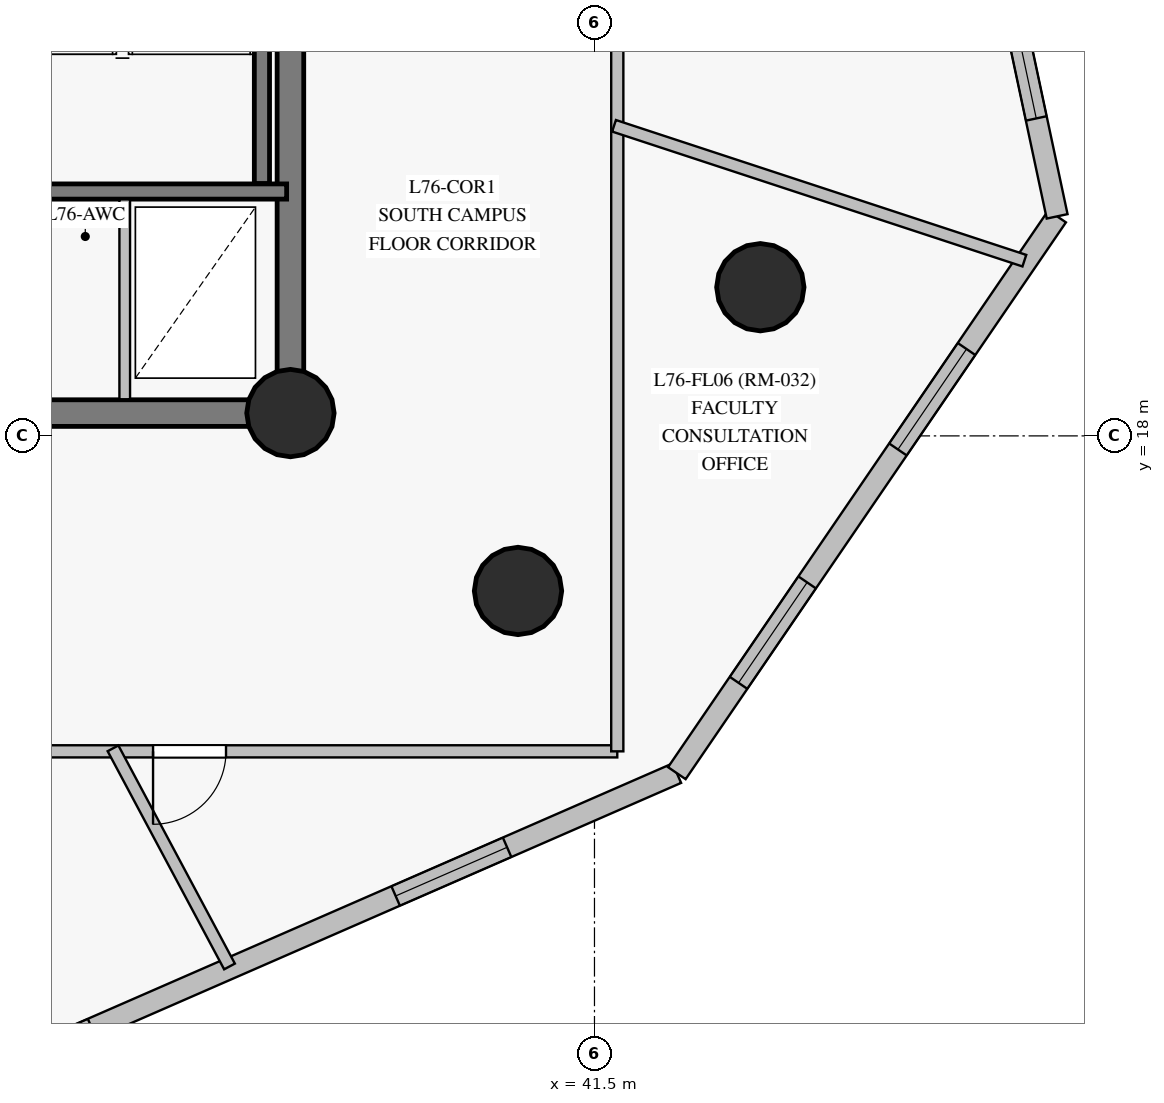
"""IFC4 building model, lengths in metres.
Left out: names, types, materials, properties, quantities, classifications, styles, units other than length and angle.
Written with IfcOpenShell. Run it as: python <this file> out.ifc"""

import sys

from ifc_helpers import new_model, si_unit, direction, frame, frame_2d, origin, origin_with_axes, origin_2d, place, context, subcontext, project, spatial, rectangle, circle, extrude, source, transform, mapped, element, fill, save


model = new_model("IFC4")
c1 = context("Model", 3, precision=1e-05, world=origin(), true_north=direction((0.0, 1.0)))
c2 = subcontext(c1, "Body", "Model", "MODEL_VIEW")
j1 = project(units=[si_unit("LENGTHUNIT", "METRE"), si_unit("PLANEANGLEUNIT", "RADIAN")], contexts=[c1])
p1 = place(None, origin())
s1 = spatial("IfcSite", under=j1, at=p1, CompositionType="ELEMENT")
p2 = place(p1, origin())
s2 = spatial("IfcBuilding", under=s1, at=p2, CompositionType="ELEMENT")
p3 = place(p2, frame((0.0, 0.0, 256.55)))
s3 = spatial("IfcBuildingStorey", under=s2, at=p3, CompositionType="ELEMENT", Elevation=256.55)
p4 = place(p3, frame((26.55, 18.3, 0.0), z_axis=(0.0, 0.0, 1.0), x_axis=(1.0, 0.0, 0.0)))
e1 = element("IfcWall", 1, at=p4, inside=s3, PredefinedType="SHEAR", context=c2, shape_type="SweptSolid", body=[
    extrude(rectangle(XDim=10.95, YDim=0.35, at=frame_2d((5.475, 0.0))), origin(), (0.0, 0.0, 1.0), 2.85),
])
p5 = place(p4, frame((4.55, 0.0, 0.0)))
e2 = element("IfcOpeningElement", 2, at=p5, cuts=e1, PredefinedType="OPENING", context=c2, shape_type="SweptSolid", body=[
    extrude(rectangle(XDim=1.4, YDim=2.2, at=frame_2d((0.7, 1.1))), frame((0.0, 0.185, 0.0), z_axis=(0.0, -1.0, 0.0), x_axis=(1.0, 0.0, 0.0)), (0.0, 0.0, 1.0), 0.37),
])
p6 = place(p3, frame((37.5, 18.3, 0.0), z_axis=(0.0, 0.0, 1.0), x_axis=(0.0, 1.0, 0.0)))
e3 = element("IfcWall", 3, at=p6, inside=s3, PredefinedType="SHEAR", context=c2, shape_type="SweptSolid", body=[
    extrude(rectangle(XDim=16.4, YDim=0.35, at=frame_2d((8.2, 0.0))), origin(), (0.0, 0.0, 1.0), 2.85),
])
p7 = place(p6, frame((13.85, 0.0, 0.0)))
e4 = element("IfcOpeningElement", 4, at=p7, cuts=e3, PredefinedType="OPENING", context=c2, shape_type="SweptSolid", body=[
    extrude(rectangle(XDim=1.2, YDim=2.15, at=frame_2d((0.6, 1.075))), frame((0.0, 0.185, 0.0), z_axis=(0.0, -1.0, 0.0), x_axis=(1.0, 0.0, 0.0)), (0.0, 0.0, 1.0), 0.37),
])
m1 = source(origin_with_axes(), c2, "Body", "SweptSolid", [
    extrude(circle(Radius=0.575, at=origin_2d()), origin(), (0.0, 0.0, 1.0), 3.05),
])
for number, where, z_axis, x_axis in (
    (5, (37.5, 18.3, 0.0), (0.0, 0.0, 1.0), (1.0, 0.0, 0.0)),
    (6, (43.682, 19.956, 0.0), (0.0, 0.0, 1.0), (1.0, 0.0, 0.0)),
    (7, (40.494, 15.96, 0.0), (0.0, 0.0, 1.0), (1.0, 0.0, 0.0)),
):
    element("IfcColumn", number, at=place(p3, frame(where, z_axis=z_axis, x_axis=x_axis)), inside=s3, PredefinedType="COLUMN", context=c2, shape_type="MappedRepresentation", body=[
        mapped(m1, transform((0.0, 0.0, 0.0), scale=1.0)),
    ])
p8 = place(p3, frame((31.554, 8.746, 0.0), z_axis=(0.0, 0.0, 1.0), x_axis=(0.916405758195, 0.400250529477, 0.0)))
e8 = element("IfcWall", 8, at=p8, inside=s3, PredefinedType="SOLIDWALL", context=c2, shape_type="SweptSolid", body=[
    extrude(rectangle(XDim=12.036, YDim=0.28, at=frame_2d((6.018, 0.0))), origin(), (0.0, 0.0, 1.0), 2.85),
])
p9 = place(p8, frame((2.041, 0.0, 0.85)))
e9 = element("IfcOpeningElement", 9, at=p9, cuts=e8, PredefinedType="OPENING", context=c2, shape_type="SweptSolid", body=[
    extrude(rectangle(XDim=1.6, YDim=1.6, at=frame_2d((0.8, 0.8))), frame((0.0, 0.15, 0.0), z_axis=(0.0, -1.0, 0.0), x_axis=(1.0, 0.0, 0.0)), (0.0, 0.0, 1.0), 0.3),
])
p10 = place(p8, frame((7.999, 0.0, 0.85)))
e10 = element("IfcOpeningElement", 10, at=p10, cuts=e8, PredefinedType="OPENING", context=c2, shape_type="SweptSolid", body=[
    extrude(rectangle(XDim=1.6, YDim=1.6, at=frame_2d((0.8, 0.8))), frame((0.0, 0.15, 0.0), z_axis=(0.0, -1.0, 0.0), x_axis=(1.0, 0.0, 0.0)), (0.0, 0.0, 1.0), 0.3),
])
p11 = place(p3, frame((42.584, 13.563, 0.0), z_axis=(0.0, 0.0, 1.0), x_axis=(0.564007879962, 0.82576940567, 0.0)))
e11 = element("IfcWall", 11, at=p11, inside=s3, PredefinedType="SOLIDWALL", context=c2, shape_type="SweptSolid", body=[
    extrude(rectangle(XDim=8.871, YDim=0.28, at=frame_2d((4.436, 0.0))), origin(), (0.0, 0.0, 1.0), 2.85),
])
p12 = place(p11, frame((1.439, 0.0, 0.85)))
e12 = element("IfcOpeningElement", 12, at=p12, cuts=e11, PredefinedType="OPENING", context=c2, shape_type="SweptSolid", body=[
    extrude(rectangle(XDim=1.6, YDim=1.6, at=frame_2d((0.8, 0.8))), frame((0.0, 0.15, 0.0), z_axis=(0.0, -1.0, 0.0), x_axis=(1.0, 0.0, 0.0)), (0.0, 0.0, 1.0), 0.3),
])
p13 = place(p11, frame((5.157, 0.0, 0.85)))
e13 = element("IfcOpeningElement", 13, at=p13, cuts=e11, PredefinedType="OPENING", context=c2, shape_type="SweptSolid", body=[
    extrude(rectangle(XDim=1.6, YDim=1.6, at=frame_2d((0.8, 0.8))), frame((0.0, 0.15, 0.0), z_axis=(0.0, -1.0, 0.0), x_axis=(1.0, 0.0, 0.0)), (0.0, 0.0, 1.0), 0.3),
])
p14 = place(p3, frame((47.587, 20.888, 0.0), z_axis=(0.0, 0.0, 1.0), x_axis=(-0.208460422932, 0.978030803232, 0.0)))
e14 = element("IfcWall", 14, at=p14, inside=s3, PredefinedType="SOLIDWALL", context=c2, shape_type="SweptSolid", body=[
    extrude(rectangle(XDim=10.72, YDim=0.28, at=frame_2d((5.36, 0.0))), origin(), (0.0, 0.0, 1.0), 2.85),
])
p15 = place(p14, frame((1.317, 0.0, 0.85)))
e15 = element("IfcOpeningElement", 15, at=p15, cuts=e14, PredefinedType="OPENING", context=c2, shape_type="SweptSolid", body=[
    extrude(rectangle(XDim=1.6, YDim=1.6, at=frame_2d((0.8, 0.8))), frame((0.0, 0.15, 0.0), z_axis=(0.0, -1.0, 0.0), x_axis=(1.0, 0.0, 0.0)), (0.0, 0.0, 1.0), 0.3),
])
p16 = place(p14, frame((4.792, 0.0, 0.85)))
e16 = element("IfcOpeningElement", 16, at=p16, cuts=e14, PredefinedType="OPENING", context=c2, shape_type="SweptSolid", body=[
    extrude(rectangle(XDim=1.6, YDim=1.6, at=frame_2d((0.8, 0.8))), frame((0.0, 0.15, 0.0), z_axis=(0.0, -1.0, 0.0), x_axis=(1.0, 0.0, 0.0)), (0.0, 0.0, 1.0), 0.3),
])
p17 = place(p14, frame((8.354, 0.0, 0.85)))
e17 = element("IfcOpeningElement", 17, at=p17, cuts=e14, PredefinedType="OPENING", context=c2, shape_type="SweptSolid", body=[
    extrude(rectangle(XDim=1.6, YDim=1.6, at=frame_2d((0.8, 0.8))), frame((0.0, 0.15, 0.0), z_axis=(0.0, -1.0, 0.0), x_axis=(1.0, 0.0, 0.0)), (0.0, 0.0, 1.0), 0.3),
])
p18 = place(p3, frame((37.125, 21.32, 0.0), z_axis=(0.0, 0.0, 1.0), x_axis=(0.0, 1.0, 0.0)))
e18 = element("IfcWall", 18, at=p18, inside=s3, PredefinedType="SHEAR", context=c2, shape_type="SweptSolid", body=[
    extrude(rectangle(XDim=7.5, YDim=0.2, at=frame_2d((3.75, 0.0))), origin(), (0.0, 0.0, 1.0), 2.85),
])
p19 = place(p3, frame((33.455, 21.215, 0.0), z_axis=(0.0, 0.0, 1.0), x_axis=(1.0, 0.0, 0.0)))
e19 = element("IfcWall", 19, at=p19, inside=s3, PredefinedType="SHEAR", context=c2, shape_type="SweptSolid", body=[
    extrude(rectangle(XDim=3.995, YDim=0.2, at=frame_2d((1.998, 0.0))), origin(), (0.0, 0.0, 1.0), 2.85),
])
p20 = place(p3, frame((41.8, 13.85, 0.0), z_axis=(0.0, 0.0, 1.0), x_axis=(-1.0, 0.0, 0.0)))
e20 = element("IfcWall", 20, at=p20, inside=s3, PredefinedType="PARTITIONING", context=c2, shape_type="SweptSolid", body=[
    extrude(rectangle(XDim=25.05, YDim=0.16, at=frame_2d((12.525, 0.0))), origin(), (0.0, 0.0, 1.0), 2.3),
])
p21 = place(p20, frame((14.763, 0.0, 0.0)))
e21 = element("IfcOpeningElement", 21, at=p21, cuts=e20, PredefinedType="OPENING", context=c2, shape_type="SweptSolid", body=[
    extrude(rectangle(XDim=0.96, YDim=2.15, at=frame_2d((0.48, 1.075))), frame((0.0, 0.09, 0.0), z_axis=(0.0, -1.0, 0.0), x_axis=(1.0, 0.0, 0.0)), (0.0, 0.0, 1.0), 0.18),
])
p22 = place(p20, frame((18.452, 0.0, 0.0)))
e22 = element("IfcOpeningElement", 22, at=p22, cuts=e20, PredefinedType="OPENING", context=c2, shape_type="SweptSolid", body=[
    extrude(rectangle(XDim=0.96, YDim=2.15, at=frame_2d((0.48, 1.075))), frame((0.0, 0.09, 0.0), z_axis=(0.0, -1.0, 0.0), x_axis=(1.0, 0.0, 0.0)), (0.0, 0.0, 1.0), 0.18),
])
p23 = place(p20, frame((8.292, 0.0, 0.0)))
e23 = element("IfcOpeningElement", 23, at=p23, cuts=e20, PredefinedType="OPENING", context=c2, shape_type="SweptSolid", body=[
    extrude(rectangle(XDim=0.96, YDim=2.15, at=frame_2d((0.48, 1.075))), frame((0.0, 0.09, 0.0), z_axis=(0.0, -1.0, 0.0), x_axis=(1.0, 0.0, 0.0)), (0.0, 0.0, 1.0), 0.18),
])
p24 = place(p20, frame((5.147, 0.0, 0.0)))
e24 = element("IfcOpeningElement", 24, at=p24, cuts=e20, PredefinedType="OPENING", context=c2, shape_type="SweptSolid", body=[
    extrude(rectangle(XDim=0.96, YDim=2.15, at=frame_2d((0.48, 1.075))), frame((0.0, 0.09, 0.0), z_axis=(0.0, -1.0, 0.0), x_axis=(1.0, 0.0, 0.0)), (0.0, 0.0, 1.0), 0.18),
])
p25 = place(p3, frame((41.8, 33.45, 0.0), z_axis=(0.0, 0.0, 1.0), x_axis=(0.0, -1.0, 0.0)))
e25 = element("IfcWall", 25, at=p25, inside=s3, PredefinedType="PARTITIONING", context=c2, shape_type="SweptSolid", body=[
    extrude(rectangle(XDim=19.6, YDim=0.16, at=frame_2d((9.8, 0.0))), origin(), (0.0, 0.0, 1.0), 2.3),
])
p26 = place(p25, frame((9.325, 0.0, 0.0)))
e26 = element("IfcOpeningElement", 26, at=p26, cuts=e25, PredefinedType="OPENING", context=c2, shape_type="SweptSolid", body=[
    extrude(rectangle(XDim=0.96, YDim=2.15, at=frame_2d((0.48, 1.075))), frame((0.0, 0.09, 0.0), z_axis=(0.0, -1.0, 0.0), x_axis=(1.0, 0.0, 0.0)), (0.0, 0.0, 1.0), 0.18),
])
p27 = place(p25, frame((4.335, 0.0, 0.0)))
e27 = element("IfcOpeningElement", 27, at=p27, cuts=e25, PredefinedType="OPENING", context=c2, shape_type="SweptSolid", body=[
    extrude(rectangle(XDim=0.96, YDim=2.15, at=frame_2d((0.48, 1.075))), frame((0.0, 0.09, 0.0), z_axis=(0.0, -1.0, 0.0), x_axis=(1.0, 0.0, 0.0)), (0.0, 0.0, 1.0), 0.18),
])
p28 = place(p3, frame((41.757, 22.08, 0.0), z_axis=(0.0, 0.0, 1.0), x_axis=(0.949994063859, -0.312267959664, 0.0)))
e28 = element("IfcWall", 28, at=p28, inside=s3, PredefinedType="PARTITIONING", context=c2, shape_type="SweptSolid", body=[
    extrude(rectangle(XDim=5.682, YDim=0.16, at=frame_2d((2.841, 0.0))), origin(), (0.0, 0.0, 1.0), 2.85),
])
p29 = place(p3, frame((35.166, 13.89, 0.0), z_axis=(0.0, 0.0, 1.0), x_axis=(0.471094475936, -0.882082759577, 0.0)))
e29 = element("IfcWall", 29, at=p29, inside=s3, PredefinedType="PARTITIONING", context=c2, shape_type="SweptSolid", body=[
    extrude(rectangle(XDim=3.253, YDim=0.16, at=frame_2d((1.627, 0.0))), origin(), (0.0, 0.0, 1.0), 2.85),
])
p30 = place(p3, frame((35.32, 18.482, 0.0), z_axis=(0.0, 0.0, 1.0), x_axis=(0.0, 1.0, 0.0)))
e30 = element("IfcWall", 30, at=p30, inside=s3, PredefinedType="PARTITIONING", context=c2, shape_type="SweptSolid", body=[
    extrude(rectangle(XDim=2.629, YDim=0.14, at=frame_2d((1.314, 0.0))), origin(), (0.0, 0.0, 1.0), 2.85),
])
m2 = source(origin_with_axes(), c2, "Body", "SweptSolid", [
    extrude(rectangle(XDim=1.6, YDim=1.6, at=frame_2d((0.8, 0.8))), frame((0.0, 0.03, 0.0), z_axis=(0.0, -1.0, 0.0), x_axis=(1.0, 0.0, 0.0)), (0.0, 0.0, 1.0), 0.06),
])
p31 = place(p10, origin())
e31 = element("IfcWindow", 31, at=p31, inside=s3, PartitioningType="SINGLE_PANEL", PredefinedType="WINDOW", context=c2, shape_type="MappedRepresentation", body=[
    mapped(m2, transform((0.0, 0.0, 0.0), scale=1.0)),
])
fill(e10, e31)
p32 = place(p12, origin())
e32 = element("IfcWindow", 32, at=p32, inside=s3, PartitioningType="SINGLE_PANEL", PredefinedType="WINDOW", context=c2, shape_type="MappedRepresentation", body=[
    mapped(m2, transform((0.0, 0.0, 0.0), scale=1.0)),
])
fill(e12, e32)
p33 = place(p13, origin())
e33 = element("IfcWindow", 33, at=p33, inside=s3, PartitioningType="SINGLE_PANEL", PredefinedType="WINDOW", context=c2, shape_type="MappedRepresentation", body=[
    mapped(m2, transform((0.0, 0.0, 0.0), scale=1.0)),
])
fill(e13, e33)
p34 = place(p15, origin())
e34 = element("IfcWindow", 34, at=p34, inside=s3, PartitioningType="SINGLE_PANEL", PredefinedType="WINDOW", context=c2, shape_type="MappedRepresentation", body=[
    mapped(m2, transform((0.0, 0.0, 0.0), scale=1.0)),
])
fill(e15, e34)
m3 = source(origin_with_axes(), c2, "Body", "SweptSolid", [
    extrude(rectangle(XDim=0.96, YDim=2.15, at=frame_2d((0.48, 1.075))), frame((0.0, 0.025, 0.0), z_axis=(0.0, -1.0, 0.0), x_axis=(1.0, 0.0, 0.0)), (0.0, 0.0, 1.0), 0.05),
])
p35 = place(p24, origin())
e35 = element("IfcDoor", 35, at=p35, inside=s3, OperationType="SINGLE_SWING_RIGHT", PredefinedType="DOOR", context=c2, shape_type="MappedRepresentation", body=[
    mapped(m3, transform((0.0, 0.0, 0.0), scale=1.0)),
])
fill(e24, e35)
save(model, sys.argv[1])
